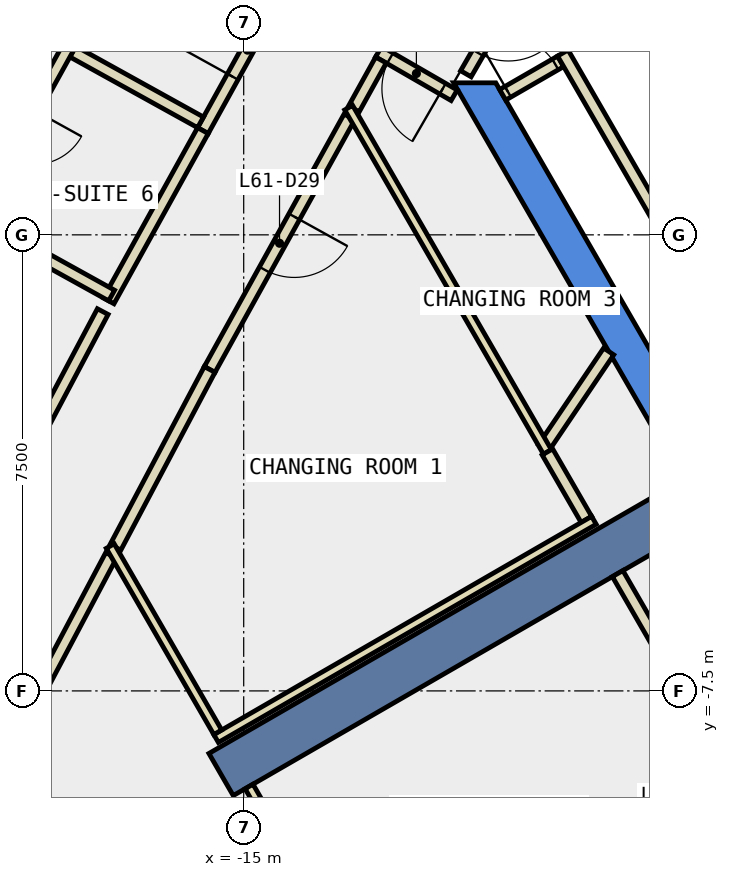
"""IFC4 building model, lengths in metres.
Left out: names, types, materials, properties, quantities, classifications, styles, units other than length and angle.
Written with IfcOpenShell. Run it as: python <this file> out.ifc"""

import sys

from ifc_helpers import new_model, si_unit, direction, frame, frame_2d, origin, place, context, subcontext, project, spatial, polyline, rectangle, outline, extrude, element, fill, save


model = new_model("IFC4")
c1 = context("Model", 3, precision=1e-05, world=origin(), true_north=direction((0.0, 1.0)))
c2 = subcontext(c1, "Body", "Model", "MODEL_VIEW")
j1 = project(units=[si_unit("LENGTHUNIT", "METRE"), si_unit("PLANEANGLEUNIT", "RADIAN")], contexts=[c1])
p1 = place(None, origin())
s1 = spatial("IfcSite", under=j1, at=p1, CompositionType="ELEMENT")
p2 = place(p1, origin())
s2 = spatial("IfcBuilding", under=s1, at=p2, CompositionType="ELEMENT")
p3 = place(p2, frame((0.0, 0.0, 266.6)))
s3 = spatial("IfcBuildingStorey", under=s2, at=p3, CompositionType="ELEMENT", Elevation=266.6)
p4 = place(p3, frame((0.0, 0.0, -0.34)))
e1 = element("IfcWall", 1, at=p4, inside=s3, PredefinedType="SHEAR", context=c2, shape_type="SweptSolid", body=[
    extrude(outline(polyline([(-11.547, 2.5), (-5.774, -7.5), (-5.427, -6.9), (-10.854, 2.5), (-11.547, 2.5)])), origin(), (0.0, 0.0, 1.0), 3.6),
])
p5 = place(p3, frame((-7.578, -4.375, -0.34), z_axis=(0.0, 0.0, 1.0), x_axis=(-0.866024315419, -0.5000018851, 0.0)))
e2 = element("IfcWall", 2, at=p5, inside=s3, PredefinedType="SHEAR", context=c2, shape_type="SweptSolid", body=[
    extrude(rectangle(XDim=9.0, YDim=0.8, at=frame_2d((4.5, 0.0))), origin(), (0.0, 0.0, 1.0), 3.6),
])
p6 = place(p3, frame((-11.539, 2.295, 0.0), z_axis=(0.0, 0.0, 1.0), x_axis=(-0.866023989838, 0.500002449018, 0.0)))
e3 = element("IfcWall", 3, at=p6, inside=s3, PredefinedType="PARTITIONING", context=c2, shape_type="SweptSolid", body=[
    extrude(rectangle(XDim=1.434, YDim=0.2, at=frame_2d((0.717, 0.0))), origin(), (0.0, 0.0, 1.0), 3.26),
])
p7 = place(p6, frame((0.217, 0.0, 0.0)))
e4 = element("IfcOpeningElement", 4, at=p7, cuts=e3, PredefinedType="OPENING", context=c2, shape_type="SweptSolid", body=[
    extrude(rectangle(XDim=1.0, YDim=2.1, at=frame_2d((0.5, 1.05))), frame((0.0, 0.11, 0.0), z_axis=(0.0, -1.0, 0.0), x_axis=(1.0, 0.0, 0.0)), (0.0, 0.0, 1.0), 0.22),
])
p8 = place(p3, frame((-12.743, 2.875, 0.0), z_axis=(0.0, 0.0, 1.0), x_axis=(-0.484334040176, -0.8748831565, 0.0)))
e5 = element("IfcWall", 5, at=p8, inside=s3, PredefinedType="PARTITIONING", context=c2, shape_type="SweptSolid", body=[
    extrude(rectangle(XDim=0.919, YDim=0.2, at=frame_2d((0.459, 0.0))), origin(), (0.0, 0.0, 1.0), 3.26),
])
p9 = place(p3, frame((-13.261, 1.939, 0.0), z_axis=(0.0, 0.0, 1.0), x_axis=(-0.484323615817, -0.874888927329, 0.0)))
e6 = element("IfcWall", 6, at=p9, inside=s3, PredefinedType="PARTITIONING", context=c2, shape_type="SweptSolid", body=[
    extrude(rectangle(XDim=4.747, YDim=0.2, at=frame_2d((2.374, 0.0))), origin(), (0.0, 0.0, 1.0), 3.26),
])
p10 = place(p9, frame((1.874, 0.0, 0.0)))
e7 = element("IfcOpeningElement", 7, at=p10, cuts=e6, PredefinedType="OPENING", context=c2, shape_type="SweptSolid", body=[
    extrude(rectangle(XDim=1.0, YDim=2.1, at=frame_2d((0.5, 1.05))), frame((0.0, 0.11, 0.0), z_axis=(0.0, -1.0, 0.0), x_axis=(1.0, 0.0, 0.0)), (0.0, 0.0, 1.0), 0.22),
])
p11 = place(p3, frame((-15.56, -2.214, 0.0), z_axis=(0.0, 0.0, 1.0), x_axis=(-0.468104679961, -0.883673021314, 0.0)))
e8 = element("IfcWall", 8, at=p11, inside=s3, PredefinedType="PARTITIONING", context=c2, shape_type="SweptSolid", body=[
    extrude(rectangle(XDim=3.309, YDim=0.2, at=frame_2d((1.654, 0.0))), origin(), (0.0, 0.0, 1.0), 3.26),
])
p12 = place(p3, frame((-17.18, -5.271, 0.0), z_axis=(0.0, 0.0, 1.0), x_axis=(-0.468212372113, -0.883615965564, 0.0)))
e9 = element("IfcWall", 9, at=p12, inside=s3, PredefinedType="PARTITIONING", context=c2, shape_type="SweptSolid", body=[
    extrude(rectangle(XDim=2.557, YDim=0.2, at=frame_2d((1.278, 0.0))), origin(), (0.0, 0.0, 1.0), 3.26),
])
p13 = place(p3, frame((-15.671, 1.714, 0.0), z_axis=(0.0, 0.0, 1.0), x_axis=(0.484203367026, 0.874955484216, 0.0)))
e10 = element("IfcWall", 10, at=p13, inside=s3, PredefinedType="PARTITIONING", context=c2, shape_type="SweptSolid", body=[
    extrude(rectangle(XDim=3.025, YDim=0.2, at=frame_2d((1.513, 0.0))), origin(), (0.0, 0.0, 1.0), 3.26),
])
p14 = place(p13, frame((1.013, 0.0, 0.0)))
e11 = element("IfcOpeningElement", 11, at=p14, cuts=e10, PredefinedType="OPENING", context=c2, shape_type="SweptSolid", body=[
    extrude(rectangle(XDim=1.0, YDim=2.1, at=frame_2d((0.5, 1.05))), frame((0.0, 0.11, 0.0), z_axis=(0.0, -1.0, 0.0), x_axis=(1.0, 0.0, 0.0)), (0.0, 0.0, 1.0), 0.22),
])
p15 = place(p3, frame((-20.229, -6.754, 0.0), z_axis=(0.0, 0.0, 1.0), x_axis=(0.468313568794, 0.883562335822, 0.0)))
e12 = element("IfcWall", 12, at=p15, inside=s3, PredefinedType="PARTITIONING", context=c2, shape_type="SweptSolid", body=[
    extrude(rectangle(XDim=6.216, YDim=0.2, at=frame_2d((3.108, 0.0))), origin(), (0.0, 0.0, 1.0), 3.26),
])
p16 = place(p3, frame((-17.221, -1.085, 0.0), z_axis=(0.0, 0.0, 1.0), x_axis=(0.48445041864, 0.874818719438, 0.0)))
e13 = element("IfcWall", 13, at=p16, inside=s3, PredefinedType="PARTITIONING", context=c2, shape_type="SweptSolid", body=[
    extrude(rectangle(XDim=3.2, YDim=0.2, at=frame_2d((1.6, 0.0))), origin(), (0.0, 0.0, 1.0), 3.26),
])
p17 = place(p3, frame((-10.741, 2.303, 0.0), z_axis=(0.0, 0.0, 1.0), x_axis=(0.866063652425, 0.499933745558, 0.0)))
e14 = element("IfcWall", 14, at=p17, inside=s3, PredefinedType="PARTITIONING", context=c2, shape_type="SweptSolid", body=[
    extrude(rectangle(XDim=1.1, YDim=0.2, at=frame_2d((0.55, 0.0))), origin(), (0.0, 0.0, 1.0), 3.26),
])
p18 = place(p17, frame((0.1, 0.0, 0.0)))
e15 = element("IfcOpeningElement", 15, at=p18, cuts=e14, PredefinedType="OPENING", context=c2, shape_type="SweptSolid", body=[
    extrude(rectangle(XDim=0.9, YDim=2.1, at=frame_2d((0.45, 1.05))), frame((0.0, 0.11, 0.0), z_axis=(0.0, -1.0, 0.0), x_axis=(1.0, 0.0, 0.0)), (0.0, 0.0, 1.0), 0.22),
])
p19 = place(p3, frame((-9.751, 2.99, 0.0), z_axis=(0.0, 0.0, 1.0), x_axis=(0.500012163284, -0.866018381195, 0.0)))
e16 = element("IfcWall", 16, at=p19, inside=s3, PredefinedType="PARTITIONING", context=c2, shape_type="SweptSolid", body=[
    extrude(rectangle(XDim=8.0, YDim=0.2, at=frame_2d((4.0, 0.0))), origin(), (0.0, 0.0, 1.0), 3.26),
])
p20 = place(p3, frame((-10.069, -3.504, 0.0), z_axis=(0.0, 0.0, 1.0), x_axis=(0.559779346026, 0.828641710127, 0.0)))
e17 = element("IfcWall", 17, at=p20, inside=s3, PredefinedType="PARTITIONING", context=c2, shape_type="SweptSolid", body=[
    extrude(rectangle(XDim=1.915, YDim=0.2, at=frame_2d((0.958, 0.0))), origin(), (0.0, 0.0, 1.0), 3.26),
])
p21 = place(p3, frame((-13.274, 2.092, 0.0), z_axis=(0.0, 0.0, 1.0), x_axis=(0.500002592159, -0.866023907196, 0.0)))
e18 = element("IfcWall", 18, at=p21, inside=s3, PredefinedType="PARTITIONING", context=c2, shape_type="SweptSolid", body=[
    extrude(rectangle(XDim=6.538, YDim=0.15, at=frame_2d((3.269, 0.0))), origin(), (0.0, 0.0, 1.0), 3.26),
])
p22 = place(p3, frame((-9.364, -4.68, 0.0), z_axis=(0.0, 0.0, 1.0), x_axis=(-0.500052244015, 0.865995238587, 0.0)))
e19 = element("IfcWall", 19, at=p22, inside=s3, PredefinedType="PARTITIONING", context=c2, shape_type="SweptSolid", body=[
    extrude(rectangle(XDim=1.281, YDim=0.2, at=frame_2d((0.641, 0.0))), origin(), (0.0, 0.0, 1.0), 3.26),
])
p23 = place(p3, frame((-7.8, -7.39, 0.0), z_axis=(0.0, 0.0, 1.0), x_axis=(-0.499977374825, 0.866038466041, 0.0)))
e20 = element("IfcWall", 20, at=p23, inside=s3, PredefinedType="PARTITIONING", context=c2, shape_type="SweptSolid", body=[
    extrude(rectangle(XDim=2.1, YDim=0.2, at=frame_2d((1.05, 0.0))), origin(), (0.0, 0.0, 1.0), 3.26),
])
p24 = place(p3, frame((-9.24, -4.695, 0.0), z_axis=(0.0, 0.0, 1.0), x_axis=(-0.866015037582, -0.500017954359, 0.0)))
e21 = element("IfcWall", 21, at=p24, inside=s3, PredefinedType="PARTITIONING", context=c2, shape_type="SweptSolid", body=[
    extrude(rectangle(XDim=7.176, YDim=0.15, at=frame_2d((3.588, 0.0))), origin(), (0.0, 0.0, 1.0), 3.26),
])
p25 = place(p3, frame((-15.427, -8.18, 0.0), z_axis=(0.0, 0.0, 1.0), x_axis=(-0.500045204515, 0.865999303373, 0.0)))
e22 = element("IfcWall", 22, at=p25, inside=s3, PredefinedType="PARTITIONING", context=c2, shape_type="SweptSolid", body=[
    extrude(rectangle(XDim=3.536, YDim=0.15, at=frame_2d((1.768, 0.0))), origin(), (0.0, 0.0, 1.0), 3.26),
])
p26 = place(p3, frame((-12.769, -12.784, 0.0), z_axis=(0.0, 0.0, 1.0), x_axis=(-0.499998569178, 0.866026229868, 0.0)))
e23 = element("IfcWall", 23, at=p26, inside=s3, PredefinedType="PARTITIONING", context=c2, shape_type="SweptSolid", body=[
    extrude(rectangle(XDim=4.286, YDim=0.15, at=frame_2d((2.143, 0.0))), origin(), (0.0, 0.0, 1.0), 3.26),
])
p27 = place(p3, frame((-15.71, 1.85, 0.0), z_axis=(0.0, 0.0, 1.0), x_axis=(-0.874842414173, 0.484407628308, 0.0)))
e24 = element("IfcWall", 24, at=p27, inside=s3, PredefinedType="PARTITIONING", context=c2, shape_type="SweptSolid", body=[
    extrude(rectangle(XDim=2.401, YDim=0.2, at=frame_2d((1.2, 0.0))), origin(), (0.0, 0.0, 1.0), 3.26),
])
p28 = place(p3, frame((-17.849, 3.148, 0.0), z_axis=(0.0, 0.0, 1.0), x_axis=(-0.484257957482, -0.874925271446, 0.0)))
e25 = element("IfcWall", 25, at=p28, inside=s3, PredefinedType="PARTITIONING", context=c2, shape_type="SweptSolid", body=[
    extrude(rectangle(XDim=3.399, YDim=0.2, at=frame_2d((1.699, 0.0))), origin(), (0.0, 0.0, 1.0), 3.26),
])
p29 = place(p28, frame((1.25, 0.0, 0.0)))
e26 = element("IfcOpeningElement", 26, at=p29, cuts=e25, PredefinedType="OPENING", context=c2, shape_type="SweptSolid", body=[
    extrude(rectangle(XDim=0.9, YDim=2.1, at=frame_2d((0.45, 1.05))), frame((0.0, 0.11, 0.0), z_axis=(0.0, -1.0, 0.0), x_axis=(1.0, 0.0, 0.0)), (0.0, 0.0, 1.0), 0.22),
])
p30 = place(p3, frame((-19.36, 0.213, 0.0), z_axis=(0.0, 0.0, 1.0), x_axis=(0.874939003568, -0.484233146362, 0.0)))
e27 = element("IfcWall", 27, at=p30, inside=s3, PredefinedType="PARTITIONING", context=c2, shape_type="SweptSolid", body=[
    extrude(rectangle(XDim=2.501, YDim=0.2, at=frame_2d((1.25, 0.0))), origin(), (0.0, 0.0, 1.0), 3.26),
])
p31 = place(p3, frame((-10.449, 4.203, 0.0), z_axis=(0.0, 0.0, 1.0), x_axis=(-0.499914839587, -0.866074565589, 0.0)))
e28 = element("IfcWall", 28, at=p31, inside=s3, PredefinedType="PARTITIONING", context=c2, shape_type="SweptSolid", body=[
    extrude(rectangle(XDim=1.794, YDim=0.2, at=frame_2d((0.897, 0.0))), origin(), (0.0, 0.0, 1.0), 2.4),
])
p32 = place(p31, frame((0.397, 0.0, 0.0)))
e29 = element("IfcOpeningElement", 29, at=p32, cuts=e28, PredefinedType="OPENING", context=c2, shape_type="SweptSolid", body=[
    extrude(rectangle(XDim=1.0, YDim=2.1, at=frame_2d((0.5, 1.05))), frame((0.0, 0.11, 0.0), z_axis=(0.0, -1.0, 0.0), x_axis=(1.0, 0.0, 0.0)), (0.0, 0.0, 1.0), 0.22),
])
p33 = place(p3, frame((-6.25, 2.01, 0.0), z_axis=(0.0, 0.0, 1.0), x_axis=(-0.86611865017, 0.499838457731, 0.0)))
e30 = element("IfcWall", 30, at=p33, inside=s3, PredefinedType="STANDARD", context=c2, shape_type="SweptSolid", body=[
    extrude(rectangle(XDim=2.733, YDim=0.2, at=frame_2d((1.366, 0.0))), origin(), (0.0, 0.0, 1.0), 3.26),
])
p34 = place(p14, origin())
e31 = element("IfcDoor", 31, at=p34, inside=s3, OperationType="SINGLE_SWING_RIGHT", PredefinedType="DOOR", context=c2, shape_type="SweptSolid", body=[
    extrude(rectangle(XDim=1.0, YDim=2.1, at=frame_2d((0.5, 1.05))), frame((0.0, 0.025, 0.0), z_axis=(0.0, -1.0, 0.0), x_axis=(1.0, 0.0, 0.0)), (0.0, 0.0, 1.0), 0.05),
])
fill(e11, e31)
p35 = place(p10, origin())
e32 = element("IfcDoor", 32, at=p35, inside=s3, OperationType="SINGLE_SWING_LEFT", PredefinedType="DOOR", context=c2, shape_type="SweptSolid", body=[
    extrude(rectangle(XDim=1.0, YDim=2.1, at=frame_2d((0.5, 1.05))), frame((0.0, 0.025, 0.0), z_axis=(0.0, -1.0, 0.0), x_axis=(1.0, 0.0, 0.0)), (0.0, 0.0, 1.0), 0.05),
])
fill(e7, e32)
p36 = place(p7, origin())
e33 = element("IfcDoor", 33, at=p36, inside=s3, OperationType="SINGLE_SWING_RIGHT", PredefinedType="DOOR", context=c2, shape_type="SweptSolid", body=[
    extrude(rectangle(XDim=1.0, YDim=2.1, at=frame_2d((0.5, 1.05))), frame((0.0, 0.025, 0.0), z_axis=(0.0, -1.0, 0.0), x_axis=(1.0, 0.0, 0.0)), (0.0, 0.0, 1.0), 0.05),
])
fill(e4, e33)
p37 = place(p18, origin())
e34 = element("IfcDoor", 34, at=p37, inside=s3, OperationType="SINGLE_SWING_RIGHT", PredefinedType="DOOR", context=c2, shape_type="SweptSolid", body=[
    extrude(rectangle(XDim=0.9, YDim=2.1, at=frame_2d((0.45, 1.05))), frame((0.0, 0.025, 0.0), z_axis=(0.0, -1.0, 0.0), x_axis=(1.0, 0.0, 0.0)), (0.0, 0.0, 1.0), 0.05),
])
fill(e15, e34)
p38 = place(p32, origin())
e35 = element("IfcDoor", 35, at=p38, inside=s3, OperationType="SINGLE_SWING_LEFT", PredefinedType="DOOR", context=c2, shape_type="SweptSolid", body=[
    extrude(rectangle(XDim=1.0, YDim=2.1, at=frame_2d((0.5, 1.05))), frame((0.0, 0.025, 0.0), z_axis=(0.0, -1.0, 0.0), x_axis=(1.0, 0.0, 0.0)), (0.0, 0.0, 1.0), 0.05),
])
fill(e29, e35)
save(model, sys.argv[1])
